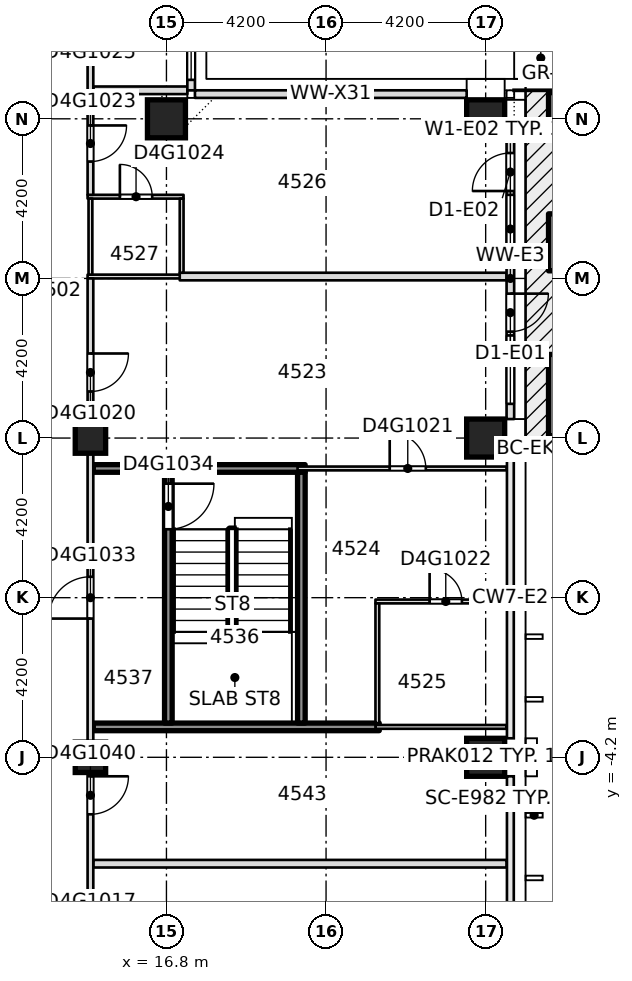
"""IFC4 building model, lengths in metres.
Left out: names, types, materials, properties, quantities, classifications, styles, units other than length and angle.
Written with IfcOpenShell. Run it as: python <this file> out.ifc"""

import sys

from ifc_helpers import new_model, si_unit, direction, frame, frame_2d, origin, origin_2d, place, context, subcontext, project, spatial, rectangle, extrude, element, fill, save


model = new_model("IFC4")
c1 = context("Model", 3, precision=1e-05, world=origin(), true_north=direction((0.0, 1.0)))
c2 = subcontext(c1, "Body", "Model", "MODEL_VIEW")
j1 = project(units=[si_unit("LENGTHUNIT", "METRE"), si_unit("PLANEANGLEUNIT", "RADIAN")], contexts=[c1])
p1 = place(None, origin())
s1 = spatial("IfcSite", under=j1, at=p1, CompositionType="ELEMENT")
p2 = place(p1, origin())
s2 = spatial("IfcBuilding", under=s1, at=p2, CompositionType="ELEMENT")
p3 = place(p2, frame((0.0, 0.0, 175.55)))
s3 = spatial("IfcBuildingStorey", under=s2, at=p3, CompositionType="ELEMENT", Elevation=175.55)
for number, where, z_axis, x_axis in (
    (1, (25.2, -4.2, -0.4), (0.0, 0.0, 1.0), (1.0, 0.0, 0.0)),
    (2, (25.2, 4.2, -0.4), (0.0, 0.0, 1.0), (1.0, 0.0, 0.0)),
    (3, (16.8, 12.6, -0.4), (0.0, 0.0, 1.0), (1.0, 0.0, 0.0)),
    (4, (25.2, 12.6, -0.4), (0.0, 0.0, 1.0), (1.0, 0.0, 0.0)),
):
    element("IfcColumn", number, at=place(p3, frame(where, z_axis=z_axis, x_axis=x_axis)), inside=s3, PredefinedType="COLUMN", context=c2, shape_type="SweptSolid", body=[
        extrude(rectangle(XDim=1.0, YDim=1.0, at=origin_2d()), origin(), (0.0, 0.0, 1.0), 3.45),
    ])
for number, where, z_axis, x_axis in (
    (5, (14.8, -4.2, -0.4), (0.0, 0.0, 1.0), (1.0, 0.0, 0.0)),
    (6, (14.8, 4.2, -0.4), (0.0, 0.0, 1.0), (1.0, 0.0, 0.0)),
):
    element("IfcColumn", number, at=place(p3, frame(where, z_axis=z_axis, x_axis=x_axis)), inside=s3, PredefinedType="COLUMN", context=c2, shape_type="SweptSolid", body=[
        extrude(rectangle(XDim=0.8, YDim=0.8, at=origin_2d()), origin(), (0.0, 0.0, 1.0), 3.45),
    ])
p4 = place(p3, frame((14.875, -7.0, 0.0), z_axis=(0.0, 0.0, 1.0), x_axis=(1.0, 0.0, 0.0)))
e7 = element("IfcWall", 7, at=p4, inside=s3, PredefinedType="PARTITIONING", context=c2, shape_type="SweptSolid", body=[
    extrude(rectangle(XDim=10.875, YDim=0.2, at=frame_2d((5.438, 0.0))), origin(), (0.0, 0.0, 1.0), 3.05),
])
p5 = place(p3, frame((14.875, -3.4, 0.0), z_axis=(0.0, 0.0, 1.0), x_axis=(1.0, 0.0, 0.0)))
e8 = element("IfcWall", 8, at=p5, inside=s3, PredefinedType="SOLIDWALL", context=c2, shape_type="SweptSolid", body=[
    extrude(rectangle(XDim=7.525, YDim=0.2, at=frame_2d((3.762, 0.0))), origin(), (0.0, 0.0, 1.0), 3.05),
])
p6 = place(p3, frame((22.3, -3.4, 0.0), z_axis=(0.0, 0.0, 1.0), x_axis=(1.0, 0.0, 0.0)))
e9 = element("IfcWall", 9, at=p6, inside=s3, PredefinedType="PARTITIONING", context=c2, shape_type="SweptSolid", body=[
    extrude(rectangle(XDim=3.45, YDim=0.1, at=frame_2d((1.725, 0.0))), origin(), (0.0, 0.0, 1.0), 3.05),
])
p7 = place(p3, frame((22.3, -0.1, 0.0), z_axis=(0.0, 0.0, 1.0), x_axis=(1.0, 0.0, 0.0)))
e10 = element("IfcWall", 10, at=p7, inside=s3, PredefinedType="PARTITIONING", context=c2, shape_type="SweptSolid", body=[
    extrude(rectangle(XDim=3.45, YDim=0.1, at=frame_2d((1.725, 0.0))), origin(), (0.0, 0.0, 1.0), 3.05),
])
p8 = place(p7, frame((1.425, 0.0, 0.0)))
e11 = element("IfcOpeningElement", 11, at=p8, cuts=e10, PredefinedType="OPENING", context=c2, shape_type="SweptSolid", body=[
    extrude(rectangle(XDim=0.85, YDim=2.1, at=frame_2d((0.425, 1.05))), frame((0.0, 0.06, 0.0), z_axis=(0.0, -1.0, 0.0), x_axis=(1.0, 0.0, 0.0)), (0.0, 0.0, 1.0), 0.12),
])
p9 = place(p3, frame((14.875, 3.4, 0.0), z_axis=(0.0, 0.0, 1.0), x_axis=(1.0, 0.0, 0.0)))
e12 = element("IfcWall", 12, at=p9, inside=s3, PredefinedType="SOLIDWALL", context=c2, shape_type="SweptSolid", body=[
    extrude(rectangle(XDim=5.575, YDim=0.2, at=frame_2d((2.788, 0.0))), origin(), (0.0, 0.0, 1.0), 3.05),
])
p10 = place(p3, frame((20.25, 3.4, 0.0), z_axis=(0.0, 0.0, 1.0), x_axis=(1.0, 0.0, 0.0)))
e13 = element("IfcWall", 13, at=p10, inside=s3, PredefinedType="PARTITIONING", context=c2, shape_type="SweptSolid", body=[
    extrude(rectangle(XDim=5.5, YDim=0.1, at=frame_2d((2.75, 0.0))), origin(), (0.0, 0.0, 1.0), 3.05),
])
p11 = place(p10, frame((2.425, 0.0, 0.0)))
e14 = element("IfcOpeningElement", 14, at=p11, cuts=e13, PredefinedType="OPENING", context=c2, shape_type="SweptSolid", body=[
    extrude(rectangle(XDim=0.95, YDim=2.1, at=frame_2d((0.475, 1.05))), frame((0.0, 0.06, 0.0), z_axis=(0.0, -1.0, 0.0), x_axis=(1.0, 0.0, 0.0)), (0.0, 0.0, 1.0), 0.12),
])
p12 = place(p3, frame((14.725, 8.45, 0.0), z_axis=(0.0, 0.0, 1.0), x_axis=(1.0, 0.0, 0.0)))
e15 = element("IfcWall", 15, at=p12, inside=s3, PredefinedType="PARTITIONING", context=c2, shape_type="SweptSolid", body=[
    extrude(rectangle(XDim=2.525, YDim=0.1, at=frame_2d((1.262, 0.0))), origin(), (0.0, 0.0, 1.0), 3.05),
])
p13 = place(p3, frame((17.15, 8.45, 0.0), z_axis=(0.0, 0.0, 1.0), x_axis=(1.0, 0.0, 0.0)))
e16 = element("IfcWall", 16, at=p13, inside=s3, PredefinedType="PARTITIONING", context=c2, shape_type="SweptSolid", body=[
    extrude(rectangle(XDim=8.6, YDim=0.2, at=frame_2d((4.3, 0.0))), origin(), (0.0, 0.0, 1.0), 3.05),
])
p14 = place(p3, frame((14.725, 10.55, 0.0), z_axis=(0.0, 0.0, 1.0), x_axis=(1.0, 0.0, 0.0)))
e17 = element("IfcWall", 17, at=p14, inside=s3, PredefinedType="PARTITIONING", context=c2, shape_type="SweptSolid", body=[
    extrude(rectangle(XDim=2.525, YDim=0.1, at=frame_2d((1.262, 0.0))), origin(), (0.0, 0.0, 1.0), 3.05),
])
p15 = place(p14, frame((0.85, 0.0, 0.0)))
e18 = element("IfcOpeningElement", 18, at=p15, cuts=e17, PredefinedType="OPENING", context=c2, shape_type="SweptSolid", body=[
    extrude(rectangle(XDim=0.85, YDim=2.1, at=frame_2d((0.425, 1.05))), frame((0.0, 0.06, 0.0), z_axis=(0.0, -1.0, 0.0), x_axis=(1.0, 0.0, 0.0)), (0.0, 0.0, 1.0), 0.12),
])
p16 = place(p3, frame((14.875, 13.35, 0.0), z_axis=(0.0, 0.0, 1.0), x_axis=(1.0, 0.0, 0.0)))
e19 = element("IfcWall", 19, at=p16, inside=s3, PredefinedType="PARTITIONING", context=c2, shape_type="SweptSolid", body=[
    extrude(rectangle(XDim=2.475, YDim=0.2, at=frame_2d((1.238, 0.0))), origin(), (0.0, 0.0, 1.0), 3.05),
])
p17 = place(p3, frame((14.8, -10.525, 0.0), z_axis=(0.0, 0.0, 1.0), x_axis=(0.0, 1.0, 0.0)))
e20 = element("IfcWall", 20, at=p17, inside=s3, PredefinedType="PARTITIONING", context=c2, shape_type="SweptSolid", body=[
    extrude(rectangle(XDim=18.925, YDim=0.15, at=frame_2d((9.462, 0.0))), origin(), (0.0, 0.0, 1.0), 3.05),
])
p18 = place(p17, frame((0.925, 0.0, 0.0)))
e21 = element("IfcOpeningElement", 21, at=p18, cuts=e20, PredefinedType="OPENING", context=c2, shape_type="SweptSolid", body=[
    extrude(rectangle(XDim=1.0, YDim=2.1, at=frame_2d((0.5, 1.05))), frame((0.0, 0.085, 0.0), z_axis=(0.0, -1.0, 0.0), x_axis=(1.0, 0.0, 0.0)), (0.0, 0.0, 1.0), 0.17),
])
p19 = place(p17, frame((15.95, 0.0, 0.0)))
e22 = element("IfcOpeningElement", 22, at=p19, cuts=e20, PredefinedType="OPENING", context=c2, shape_type="SweptSolid", body=[
    extrude(rectangle(XDim=1.0, YDim=2.1, at=frame_2d((0.5, 1.05))), frame((0.0, 0.085, 0.0), z_axis=(0.0, -1.0, 0.0), x_axis=(1.0, 0.0, 0.0)), (0.0, 0.0, 1.0), 0.17),
])
p20 = place(p17, frame((9.975, 0.0, 0.0)))
e23 = element("IfcOpeningElement", 23, at=p20, cuts=e20, PredefinedType="OPENING", context=c2, shape_type="SweptSolid", body=[
    extrude(rectangle(XDim=1.1, YDim=2.1, at=frame_2d((0.55, 1.05))), frame((0.0, 0.085, 0.0), z_axis=(0.0, -1.0, 0.0), x_axis=(1.0, 0.0, 0.0)), (0.0, 0.0, 1.0), 0.17),
])
p21 = place(p17, frame((4.825, 0.0, 0.0)))
e24 = element("IfcOpeningElement", 24, at=p21, cuts=e20, PredefinedType="OPENING", context=c2, shape_type="SweptSolid", body=[
    extrude(rectangle(XDim=1.0, YDim=2.1, at=frame_2d((0.5, 1.05))), frame((0.0, 0.085, 0.0), z_axis=(0.0, -1.0, 0.0), x_axis=(1.0, 0.0, 0.0)), (0.0, 0.0, 1.0), 0.17),
])
p22 = place(p3, frame((14.8, 8.5, 0.0), z_axis=(0.0, 0.0, 1.0), x_axis=(0.0, 1.0, 0.0)))
e25 = element("IfcWall", 25, at=p22, inside=s3, PredefinedType="PARTITIONING", context=c2, shape_type="SweptSolid", body=[
    extrude(rectangle(XDim=2.0, YDim=0.1, at=frame_2d((1.0, 0.0))), origin(), (0.0, 0.0, 1.0), 3.05),
])
p23 = place(p3, frame((14.8, 10.6, 0.0), z_axis=(0.0, 0.0, 1.0), x_axis=(0.0, 1.0, 0.0)))
e26 = element("IfcWall", 26, at=p23, inside=s3, PredefinedType="PARTITIONING", context=c2, shape_type="SweptSolid", body=[
    extrude(rectangle(XDim=10.95, YDim=0.15, at=frame_2d((5.475, 0.0))), origin(), (0.0, 0.0, 1.0), 3.05),
])
p24 = place(p23, frame((0.875, 0.0, 0.0)))
e27 = element("IfcOpeningElement", 27, at=p24, cuts=e26, PredefinedType="OPENING", context=c2, shape_type="SweptSolid", body=[
    extrude(rectangle(XDim=0.95, YDim=2.1, at=frame_2d((0.475, 1.05))), frame((0.0, 0.085, 0.0), z_axis=(0.0, -1.0, 0.0), x_axis=(1.0, 0.0, 0.0)), (0.0, 0.0, 1.0), 0.17),
])
p25 = place(p23, frame((4.35, 0.0, 0.0)))
e28 = element("IfcOpeningElement", 28, at=p25, cuts=e26, PredefinedType="OPENING", context=c2, shape_type="SweptSolid", body=[
    extrude(rectangle(XDim=0.95, YDim=2.1, at=frame_2d((0.475, 1.05))), frame((0.0, 0.085, 0.0), z_axis=(0.0, -1.0, 0.0), x_axis=(1.0, 0.0, 0.0)), (0.0, 0.0, 1.0), 0.17),
])
p26 = place(p23, frame((8.25, 0.0, 0.0)))
e29 = element("IfcOpeningElement", 29, at=p26, cuts=e26, PredefinedType="OPENING", context=c2, shape_type="SweptSolid", body=[
    extrude(rectangle(XDim=0.95, YDim=2.1, at=frame_2d((0.475, 1.05))), frame((0.0, 0.085, 0.0), z_axis=(0.0, -1.0, 0.0), x_axis=(1.0, 0.0, 0.0)), (0.0, 0.0, 1.0), 0.17),
])
p27 = place(p3, frame((16.85, -3.3, 0.0), z_axis=(0.0, 0.0, 1.0), x_axis=(0.0, 1.0, 0.0)))
e30 = element("IfcWall", 30, at=p27, inside=s3, PredefinedType="SOLIDWALL", context=c2, shape_type="SweptSolid", body=[
    extrude(rectangle(XDim=6.6, YDim=0.2, at=frame_2d((3.3, 0.0))), origin(), (0.0, 0.0, 1.0), 3.05),
])
p28 = place(p27, frame((5.1, 0.0, 0.0)))
e31 = element("IfcOpeningElement", 31, at=p28, cuts=e30, PredefinedType="OPENING", context=c2, shape_type="SweptSolid", body=[
    extrude(rectangle(XDim=1.2, YDim=2.1, at=frame_2d((0.6, 1.05))), frame((0.0, 0.11, 0.0), z_axis=(0.0, -1.0, 0.0), x_axis=(1.0, 0.0, 0.0)), (0.0, 0.0, 1.0), 0.22),
])
p29 = place(p3, frame((17.2, 8.55, 0.0), z_axis=(0.0, 0.0, 1.0), x_axis=(0.0, 1.0, 0.0)))
e32 = element("IfcWall", 32, at=p29, inside=s3, PredefinedType="PARTITIONING", context=c2, shape_type="SweptSolid", body=[
    extrude(rectangle(XDim=1.95, YDim=0.1, at=frame_2d((0.975, 0.0))), origin(), (0.0, 0.0, 1.0), 3.05),
])
p30 = place(p3, frame((20.35, -3.3, 0.0), z_axis=(0.0, 0.0, 1.0), x_axis=(0.0, 1.0, 0.0)))
e33 = element("IfcWall", 33, at=p30, inside=s3, PredefinedType="SOLIDWALL", context=c2, shape_type="SweptSolid", body=[
    extrude(rectangle(XDim=6.6, YDim=0.2, at=frame_2d((3.3, 0.0))), origin(), (0.0, 0.0, 1.0), 3.05),
])
p31 = place(p3, frame((22.35, -3.3, 0.0), z_axis=(0.0, 0.0, 1.0), x_axis=(0.0, 1.0, 0.0)))
e34 = element("IfcWall", 34, at=p31, inside=s3, PredefinedType="PARTITIONING", context=c2, shape_type="SweptSolid", body=[
    extrude(rectangle(XDim=3.15, YDim=0.1, at=frame_2d((1.575, 0.0))), origin(), (0.0, 0.0, 1.0), 3.05),
])
p32 = place(p3, frame((25.85, 4.7, 0.0), z_axis=(0.0, 0.0, 1.0), x_axis=(0.0, 1.0, 0.0)))
e35 = element("IfcWall", 35, at=p32, inside=s3, PredefinedType="STANDARD", context=c2, shape_type="SweptSolid", body=[
    extrude(rectangle(XDim=7.4, YDim=0.2, at=frame_2d((3.7, 0.0))), origin(), (0.0, 0.0, 1.0), 3.05),
])
p33 = place(p32, frame((0.4, 0.0, 0.2)))
e36 = element("IfcOpeningElement", 36, at=p33, cuts=e35, PredefinedType="OPENING", context=c2, shape_type="SweptSolid", body=[
    extrude(rectangle(XDim=1.8, YDim=2.65, at=frame_2d((0.9, 1.325))), frame((0.0, 0.11, 0.0), z_axis=(0.0, -1.0, 0.0), x_axis=(1.0, 0.0, 0.0)), (0.0, 0.0, 1.0), 0.22),
])
p34 = place(p32, frame((2.3, 0.0, 0.0)))
e37 = element("IfcOpeningElement", 37, at=p34, cuts=e35, PredefinedType="OPENING", context=c2, shape_type="SweptSolid", body=[
    extrude(rectangle(XDim=1.0, YDim=2.4, at=frame_2d((0.5, 1.2))), frame((0.0, 0.11, 0.0), z_axis=(0.0, -1.0, 0.0), x_axis=(1.0, 0.0, 0.0)), (0.0, 0.0, 1.0), 0.22),
])
p35 = place(p32, frame((4.1, 0.0, 0.2)))
e38 = element("IfcOpeningElement", 38, at=p35, cuts=e35, PredefinedType="OPENING", context=c2, shape_type="SweptSolid", body=[
    extrude(rectangle(XDim=1.8, YDim=2.65, at=frame_2d((0.9, 1.325))), frame((0.0, 0.11, 0.0), z_axis=(0.0, -1.0, 0.0), x_axis=(1.0, 0.0, 0.0)), (0.0, 0.0, 1.0), 0.22),
])
p36 = place(p32, frame((6.0, 0.0, 0.0)))
e39 = element("IfcOpeningElement", 39, at=p36, cuts=e35, PredefinedType="OPENING", context=c2, shape_type="SweptSolid", body=[
    extrude(rectangle(XDim=1.0, YDim=2.4, at=frame_2d((0.5, 1.2))), frame((0.0, 0.11, 0.0), z_axis=(0.0, -1.0, 0.0), x_axis=(1.0, 0.0, 0.0)), (0.0, 0.0, 1.0), 0.22),
])
p37 = place(p3, frame((27.154, 4.26, -0.04), z_axis=(0.0, 0.0, 1.0), x_axis=(0.0, 1.0, 0.0)))
e40 = element("IfcWall", 40, at=p37, inside=s3, PredefinedType="USERDEFINED", context=c2, shape_type="SweptSolid", body=[
    extrude(rectangle(XDim=2.14, YDim=0.6, at=frame_2d((1.07, 0.0))), origin(), (0.0, 0.0, 1.0), 1.2),
])
p38 = place(p3, frame((27.154, 8.6, -0.04), z_axis=(0.0, 0.0, 1.0), x_axis=(0.0, 1.0, 0.0)))
e41 = element("IfcWall", 41, at=p38, inside=s3, PredefinedType="USERDEFINED", context=c2, shape_type="SweptSolid", body=[
    extrude(rectangle(XDim=1.5, YDim=0.6, at=frame_2d((0.75, 0.0))), origin(), (0.0, 0.0, 1.0), 1.2),
])
p39 = place(p3, frame((27.154, 12.3, -0.04), z_axis=(0.0, 0.0, 1.0), x_axis=(0.0, 1.0, 0.0)))
e42 = element("IfcWall", 42, at=p39, inside=s3, PredefinedType="USERDEFINED", context=c2, shape_type="SweptSolid", body=[
    extrude(rectangle(XDim=0.99, YDim=0.6, at=frame_2d((0.495, 0.0))), origin(), (0.0, 0.0, 1.0), 1.2),
])
p40 = place(p3, frame((24.7, 13.25, 0.0), z_axis=(0.0, 0.0, 1.0), x_axis=(-1.0, 0.0, 0.0)))
e43 = element("IfcWall", 43, at=p40, inside=s3, PredefinedType="STANDARD", context=c2, shape_type="SweptSolid", body=[
    extrude(rectangle(XDim=7.15, YDim=0.2, at=frame_2d((3.575, 0.0))), origin(), (0.0, 0.0, 1.0), 3.05),
])
p41 = place(p3, frame((17.45, 13.35, 0.0), z_axis=(0.0, 0.0, 1.0), x_axis=(0.0, 1.0, 0.0)))
e44 = element("IfcWall", 44, at=p41, inside=s3, PredefinedType="STANDARD", context=c2, shape_type="SweptSolid", body=[
    extrude(rectangle(XDim=7.15, YDim=0.2, at=frame_2d((3.575, 0.0))), origin(), (0.0, 0.0, 1.0), 3.05),
])
p42 = place(p41, frame((0.275, 0.0, 0.2)))
e45 = element("IfcOpeningElement", 45, at=p42, cuts=e44, PredefinedType="OPENING", context=c2, shape_type="SweptSolid", body=[
    extrude(rectangle(XDim=1.8, YDim=2.65, at=frame_2d((0.9, 1.325))), frame((0.0, 0.11, 0.0), z_axis=(0.0, -1.0, 0.0), x_axis=(1.0, 0.0, 0.0)), (0.0, 0.0, 1.0), 0.22),
])
p43 = place(p41, frame((4.37, 0.0, 0.2)))
e46 = element("IfcOpeningElement", 46, at=p43, cuts=e44, PredefinedType="OPENING", context=c2, shape_type="SweptSolid", body=[
    extrude(rectangle(XDim=1.8, YDim=2.65, at=frame_2d((0.9, 1.325))), frame((0.0, 0.11, 0.0), z_axis=(0.0, -1.0, 0.0), x_axis=(1.0, 0.0, 0.0)), (0.0, 0.0, 1.0), 0.22),
])
p44 = place(p19, origin())
e47 = element("IfcDoor", 47, at=p44, inside=s3, OperationType="SINGLE_SWING_LEFT", PredefinedType="DOOR", context=c2, shape_type="SweptSolid", body=[
    extrude(rectangle(XDim=1.0, YDim=2.1, at=frame_2d((0.5, 1.05))), frame((0.0, 0.025, 0.0), z_axis=(0.0, -1.0, 0.0), x_axis=(1.0, 0.0, 0.0)), (0.0, 0.0, 1.0), 0.05),
])
fill(e22, e47)
p45 = place(p11, origin())
e48 = element("IfcDoor", 48, at=p45, inside=s3, OperationType="SINGLE_SWING_LEFT", PredefinedType="DOOR", context=c2, shape_type="SweptSolid", body=[
    extrude(rectangle(XDim=0.95, YDim=2.1, at=frame_2d((0.475, 1.05))), frame((0.0, 0.025, 0.0), z_axis=(0.0, -1.0, 0.0), x_axis=(1.0, 0.0, 0.0)), (0.0, 0.0, 1.0), 0.05),
])
fill(e14, e48)
p46 = place(p8, origin())
e49 = element("IfcDoor", 49, at=p46, inside=s3, OperationType="SINGLE_SWING_RIGHT", PredefinedType="DOOR", context=c2, shape_type="SweptSolid", body=[
    extrude(rectangle(XDim=0.85, YDim=2.1, at=frame_2d((0.425, 1.05))), frame((0.0, 0.025, 0.0), z_axis=(0.0, -1.0, 0.0), x_axis=(1.0, 0.0, 0.0)), (0.0, 0.0, 1.0), 0.05),
])
fill(e11, e49)
p47 = place(p24, origin())
e50 = element("IfcDoor", 50, at=p47, inside=s3, OperationType="SINGLE_SWING_RIGHT", PredefinedType="DOOR", context=c2, shape_type="SweptSolid", body=[
    extrude(rectangle(XDim=0.95, YDim=2.1, at=frame_2d((0.475, 1.05))), frame((0.0, 0.025, 0.0), z_axis=(0.0, -1.0, 0.0), x_axis=(1.0, 0.0, 0.0)), (0.0, 0.0, 1.0), 0.05),
])
fill(e27, e50)
p48 = place(p15, origin())
e51 = element("IfcDoor", 51, at=p48, inside=s3, OperationType="SINGLE_SWING_RIGHT", PredefinedType="DOOR", context=c2, shape_type="SweptSolid", body=[
    extrude(rectangle(XDim=0.85, YDim=2.1, at=frame_2d((0.425, 1.05))), frame((0.0, 0.025, 0.0), z_axis=(0.0, -1.0, 0.0), x_axis=(1.0, 0.0, 0.0)), (0.0, 0.0, 1.0), 0.05),
])
fill(e18, e51)
p49 = place(p20, origin())
e52 = element("IfcDoor", 52, at=p49, inside=s3, OperationType="SINGLE_SWING_LEFT", PredefinedType="DOOR", context=c2, shape_type="SweptSolid", body=[
    extrude(rectangle(XDim=1.1, YDim=2.1, at=frame_2d((0.55, 1.05))), frame((0.0, 0.025, 0.0), z_axis=(0.0, -1.0, 0.0), x_axis=(1.0, 0.0, 0.0)), (0.0, 0.0, 1.0), 0.05),
])
fill(e23, e52)
p50 = place(p28, origin())
e53 = element("IfcDoor", 53, at=p50, inside=s3, OperationType="SINGLE_SWING_LEFT", PredefinedType="DOOR", context=c2, shape_type="SweptSolid", body=[
    extrude(rectangle(XDim=1.2, YDim=2.1, at=frame_2d((0.6, 1.05))), frame((0.0, 0.025, 0.0), z_axis=(0.0, -1.0, 0.0), x_axis=(1.0, 0.0, 0.0)), (0.0, 0.0, 1.0), 0.05),
])
fill(e31, e53)
p51 = place(p21, origin())
e54 = element("IfcDoor", 54, at=p51, inside=s3, OperationType="SINGLE_SWING_LEFT", PredefinedType="DOOR", context=c2, shape_type="SweptSolid", body=[
    extrude(rectangle(XDim=1.0, YDim=2.1, at=frame_2d((0.5, 1.05))), frame((0.0, 0.025, 0.0), z_axis=(0.0, -1.0, 0.0), x_axis=(1.0, 0.0, 0.0)), (0.0, 0.0, 1.0), 0.05),
])
fill(e24, e54)
p52 = place(p33, origin())
e55 = element("IfcWindow", 55, at=p52, inside=s3, PartitioningType="SINGLE_PANEL", PredefinedType="WINDOW", context=c2, shape_type="SweptSolid", body=[
    extrude(rectangle(XDim=1.8, YDim=2.65, at=frame_2d((0.9, 1.325))), frame((0.0, 0.03, 0.0), z_axis=(0.0, -1.0, 0.0), x_axis=(1.0, 0.0, 0.0)), (0.0, 0.0, 1.0), 0.06),
])
fill(e36, e55)
p53 = place(p34, origin())
e56 = element("IfcDoor", 56, at=p53, inside=s3, OperationType="SINGLE_SWING_LEFT", PredefinedType="DOOR", context=c2, shape_type="SweptSolid", body=[
    extrude(rectangle(XDim=1.0, YDim=2.4, at=frame_2d((0.5, 1.2))), frame((0.0, 0.025, 0.0), z_axis=(0.0, -1.0, 0.0), x_axis=(1.0, 0.0, 0.0)), (0.0, 0.0, 1.0), 0.05),
])
fill(e37, e56)
p54 = place(p35, origin())
e57 = element("IfcWindow", 57, at=p54, inside=s3, PartitioningType="SINGLE_PANEL", PredefinedType="WINDOW", context=c2, shape_type="SweptSolid", body=[
    extrude(rectangle(XDim=1.8, YDim=2.65, at=frame_2d((0.9, 1.325))), frame((0.0, 0.03, 0.0), z_axis=(0.0, -1.0, 0.0), x_axis=(1.0, 0.0, 0.0)), (0.0, 0.0, 1.0), 0.06),
])
fill(e38, e57)
p55 = place(p36, origin())
e58 = element("IfcDoor", 58, at=p55, inside=s3, OperationType="SINGLE_SWING_LEFT", PredefinedType="DOOR", context=c2, shape_type="SweptSolid", body=[
    extrude(rectangle(XDim=1.0, YDim=2.4, at=frame_2d((0.5, 1.2))), frame((0.0, 0.025, 0.0), z_axis=(0.0, -1.0, 0.0), x_axis=(1.0, 0.0, 0.0)), (0.0, 0.0, 1.0), 0.05),
])
fill(e39, e58)
p56 = place(p42, origin())
e59 = element("IfcWindow", 59, at=p56, inside=s3, PartitioningType="SINGLE_PANEL", PredefinedType="WINDOW", context=c2, shape_type="SweptSolid", body=[
    extrude(rectangle(XDim=1.8, YDim=2.65, at=frame_2d((0.9, 1.325))), frame((0.0, 0.03, 0.0), z_axis=(0.0, -1.0, 0.0), x_axis=(1.0, 0.0, 0.0)), (0.0, 0.0, 1.0), 0.06),
])
fill(e45, e59)
save(model, sys.argv[1])
